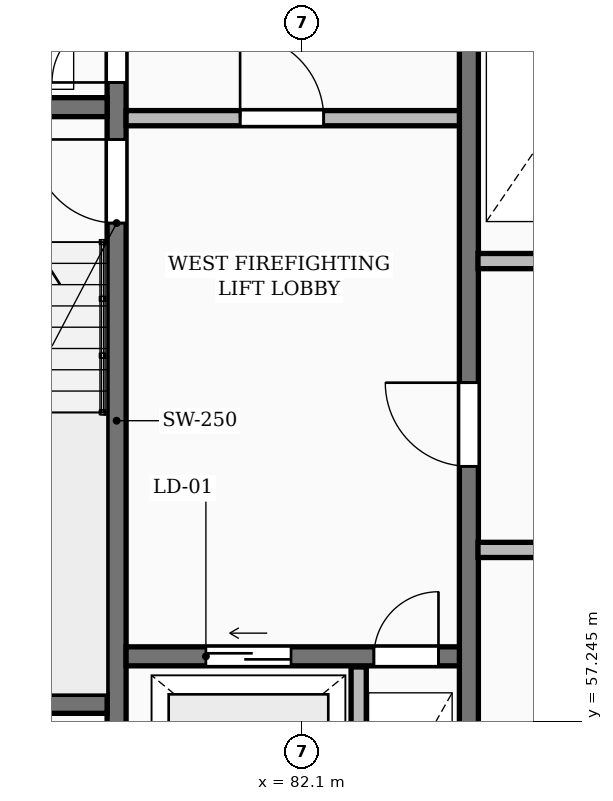
"""IFC4 building model, lengths in metres.
Left out: names, types, materials, properties, quantities, classifications, styles, units other than length and angle.
Written with IfcOpenShell. Run it as: python <this file> out.ifc"""

import sys

from ifc_helpers import new_model, si_unit, direction, frame, frame_2d, origin, place, context, subcontext, project, spatial, rectangle, extrude, element, fill, save


model = new_model("IFC4")
c1 = context("Model", 3, precision=1e-05, world=origin(), true_north=direction((0.0, 1.0)))
c2 = subcontext(c1, "Body", "Model", "MODEL_VIEW")
j1 = project(units=[si_unit("LENGTHUNIT", "METRE"), si_unit("PLANEANGLEUNIT", "RADIAN")], contexts=[c1])
p1 = place(None, origin())
s1 = spatial("IfcSite", under=j1, at=p1, CompositionType="ELEMENT")
p2 = place(p1, origin())
s2 = spatial("IfcBuilding", under=s1, at=p2, CompositionType="ELEMENT")
p3 = place(p2, frame((0.0, 0.0, 210.85)))
s3 = spatial("IfcBuildingStorey", under=s2, at=p3, CompositionType="ELEMENT", Elevation=210.85)
p4 = place(p3, frame((79.665, 55.4, 0.0), z_axis=(0.0, 0.0, 1.0), x_axis=(0.0, 1.0, 0.0)))
e1 = element("IfcWall", 1, at=p4, inside=s3, PredefinedType="SHEAR", context=c2, shape_type="SweptSolid", body=[
    extrude(rectangle(XDim=11.6, YDim=0.25, at=frame_2d((5.8, 0.0))), origin(), (0.0, 0.0, 1.0), 3.25),
])
p5 = place(p4, frame((0.55, 0.0, 0.0)))
e2 = element("IfcOpeningElement", 2, at=p5, cuts=e1, PredefinedType="OPENING", context=c2, shape_type="SweptSolid", body=[
    extrude(rectangle(XDim=0.85, YDim=2.05, at=frame_2d((0.425, 1.025))), frame((0.0, 0.135, 0.0), z_axis=(0.0, -1.0, 0.0), x_axis=(1.0, 0.0, 0.0)), (0.0, 0.0, 1.0), 0.27),
])
p6 = place(p4, frame((8.4, 0.0, 0.0)))
e3 = element("IfcOpeningElement", 3, at=p6, cuts=e1, PredefinedType="OPENING", context=c2, shape_type="SweptSolid", body=[
    extrude(rectangle(XDim=1.1, YDim=2.1, at=frame_2d((0.55, 1.05))), frame((0.0, 0.135, 0.0), z_axis=(0.0, -1.0, 0.0), x_axis=(1.0, 0.0, 0.0)), (0.0, 0.0, 1.0), 0.27),
])
p7 = place(p4, frame((10.25, 0.0, 0.0)))
e4 = element("IfcOpeningElement", 4, at=p7, cuts=e1, PredefinedType="OPENING", context=c2, shape_type="SweptSolid", body=[
    extrude(rectangle(XDim=0.85, YDim=2.05, at=frame_2d((0.425, 1.025))), frame((0.0, 0.135, 0.0), z_axis=(0.0, -1.0, 0.0), x_axis=(1.0, 0.0, 0.0)), (0.0, 0.0, 1.0), 0.27),
])
for number, where, z_axis, x_axis in (
    (5, (76.3, 57.475, 0.0), (0.0, 0.0, 1.0), (1.0, 0.0, 0.0)),
    (6, (76.3, 65.325, 0.0), (0.0, 0.0, 1.0), (1.0, 0.0, 0.0)),
):
    element("IfcWall", number, at=place(p3, frame(where, z_axis=z_axis, x_axis=x_axis)), inside=s3, PredefinedType="SHEAR", context=c2, shape_type="SweptSolid", body=[
        extrude(rectangle(XDim=3.24, YDim=0.25, at=frame_2d((1.62, 0.0))), origin(), (0.0, 0.0, 1.0), 3.25),
    ])
p8 = place(p3, frame((79.79, 58.1, 0.0), z_axis=(0.0, 0.0, 1.0), x_axis=(1.0, 0.0, 0.0)))
e7 = element("IfcWall", 7, at=p8, inside=s3, PredefinedType="SHEAR", context=c2, shape_type="SweptSolid", body=[
    extrude(rectangle(XDim=4.39, YDim=0.25, at=frame_2d((2.195, 0.0))), origin(), (0.0, 0.0, 1.0), 3.25),
])
p9 = place(p8, frame((1.05, 0.0, 0.0)))
e8 = element("IfcOpeningElement", 8, at=p9, cuts=e7, PredefinedType="OPENING", context=c2, shape_type="SweptSolid", body=[
    extrude(rectangle(XDim=1.12, YDim=2.12, at=frame_2d((0.56, 1.06))), frame((0.0, 0.135, 0.0), z_axis=(0.0, -1.0, 0.0), x_axis=(1.0, 0.0, 0.0)), (0.0, 0.0, 1.0), 0.27),
])
p10 = place(p8, frame((3.26, 0.0, 0.0)))
e9 = element("IfcOpeningElement", 9, at=p10, cuts=e7, PredefinedType="OPENING", context=c2, shape_type="SweptSolid", body=[
    extrude(rectangle(XDim=0.85, YDim=2.05, at=frame_2d((0.425, 1.025))), frame((0.0, 0.135, 0.0), z_axis=(0.0, -1.0, 0.0), x_axis=(1.0, 0.0, 0.0)), (0.0, 0.0, 1.0), 0.27),
])
p11 = place(p3, frame((82.85, 55.4, 0.0), z_axis=(0.0, 0.0, 1.0), x_axis=(0.0, 1.0, 0.0)))
e10 = element("IfcWall", 10, at=p11, inside=s3, PredefinedType="PARTITIONING", context=c2, shape_type="SweptSolid", body=[
    extrude(rectangle(XDim=2.56, YDim=0.2, at=frame_2d((1.28, 0.0))), origin(), (0.0, 0.0, 1.0), 2.97),
])
p12 = place(p3, frame((79.79, 65.18, 0.0), z_axis=(0.0, 0.0, 1.0), x_axis=(1.0, 0.0, 0.0)))
e11 = element("IfcWall", 11, at=p12, inside=s3, PredefinedType="PARTITIONING", context=c2, shape_type="SweptSolid", body=[
    extrude(rectangle(XDim=4.39, YDim=0.2, at=frame_2d((2.195, 0.0))), origin(), (0.0, 0.0, 1.0), 2.97),
])
p13 = place(p12, frame((1.5, 0.0, 0.0)))
e12 = element("IfcOpeningElement", 12, at=p13, cuts=e11, PredefinedType="OPENING", context=c2, shape_type="SweptSolid", body=[
    extrude(rectangle(XDim=1.1, YDim=2.1, at=frame_2d((0.55, 1.05))), frame((0.0, 0.11, 0.0), z_axis=(0.0, -1.0, 0.0), x_axis=(1.0, 0.0, 0.0)), (0.0, 0.0, 1.0), 0.22),
])
p14 = place(p3, frame((84.3, 55.4, 0.0), z_axis=(0.0, 0.0, 1.0), x_axis=(0.0, 1.0, 0.0)))
e13 = element("IfcWall", 13, at=p14, inside=s3, PredefinedType="SHEAR", context=c2, shape_type="SweptSolid", body=[
    extrude(rectangle(XDim=11.6, YDim=0.25, at=frame_2d((5.8, 0.0))), origin(), (0.0, 0.0, 1.0), 3.25),
])
p15 = place(p14, frame((5.2, 0.0, 0.0)))
e14 = element("IfcOpeningElement", 14, at=p15, cuts=e13, PredefinedType="OPENING", context=c2, shape_type="SweptSolid", body=[
    extrude(rectangle(XDim=1.1, YDim=2.1, at=frame_2d((0.55, 1.05))), frame((0.0, 0.135, 0.0), z_axis=(0.0, -1.0, 0.0), x_axis=(1.0, 0.0, 0.0)), (0.0, 0.0, 1.0), 0.27),
])
p16 = place(p3, frame((84.42, 59.5, 0.0), z_axis=(0.0, 0.0, 1.0), x_axis=(1.0, 0.0, 0.0)))
e15 = element("IfcWall", 15, at=p16, inside=s3, PredefinedType="PARTITIONING", context=c2, shape_type="SweptSolid", body=[
    extrude(rectangle(XDim=8.36, YDim=0.2, at=frame_2d((4.18, 0.0))), origin(), (0.0, 0.0, 1.0), 2.97),
])
p17 = place(p16, frame((3.4, 0.0, 0.0)))
e16 = element("IfcOpeningElement", 16, at=p17, cuts=e15, PredefinedType="OPENING", context=c2, shape_type="SweptSolid", body=[
    extrude(rectangle(XDim=0.92, YDim=2.08, at=frame_2d((0.46, 1.04))), frame((0.0, 0.11, 0.0), z_axis=(0.0, -1.0, 0.0), x_axis=(1.0, 0.0, 0.0)), (0.0, 0.0, 1.0), 0.22),
])
p18 = place(p3, frame((84.42, 63.3, 0.0), z_axis=(0.0, 0.0, 1.0), x_axis=(1.0, 0.0, 0.0)))
e17 = element("IfcWall", 17, at=p18, inside=s3, PredefinedType="PARTITIONING", context=c2, shape_type="SweptSolid", body=[
    extrude(rectangle(XDim=19.83, YDim=0.2, at=frame_2d((9.915, 0.0))), origin(), (0.0, 0.0, 1.0), 2.97),
])
p19 = place(p18, frame((1.15, 0.0, 0.0)))
e18 = element("IfcOpeningElement", 18, at=p19, cuts=e17, PredefinedType="OPENING", context=c2, shape_type="SweptSolid", body=[
    extrude(rectangle(XDim=0.85, YDim=2.05, at=frame_2d((0.425, 1.025))), frame((0.0, 0.11, 0.0), z_axis=(0.0, -1.0, 0.0), x_axis=(1.0, 0.0, 0.0)), (0.0, 0.0, 1.0), 0.22),
])
p20 = place(p18, frame((3.25, 0.0, 0.0)))
e19 = element("IfcOpeningElement", 19, at=p20, cuts=e17, PredefinedType="OPENING", context=c2, shape_type="SweptSolid", body=[
    extrude(rectangle(XDim=0.85, YDim=2.05, at=frame_2d((0.425, 1.025))), frame((0.0, 0.11, 0.0), z_axis=(0.0, -1.0, 0.0), x_axis=(1.0, 0.0, 0.0)), (0.0, 0.0, 1.0), 0.22),
])
p21 = place(p18, frame((13.08, 0.0, 0.0)))
e20 = element("IfcOpeningElement", 20, at=p21, cuts=e17, PredefinedType="OPENING", context=c2, shape_type="SweptSolid", body=[
    extrude(rectangle(XDim=1.5, YDim=2.2, at=frame_2d((0.75, 1.1))), frame((0.0, 0.11, 0.0), z_axis=(0.0, -1.0, 0.0), x_axis=(1.0, 0.0, 0.0)), (0.0, 0.0, 1.0), 0.22),
])
p22 = place(p18, frame((5.53, 0.0, 0.0)))
e21 = element("IfcOpeningElement", 21, at=p22, cuts=e17, PredefinedType="OPENING", context=c2, shape_type="SweptSolid", body=[
    extrude(rectangle(XDim=0.88, YDim=2.06, at=frame_2d((0.44, 1.03))), frame((0.0, 0.11, 0.0), z_axis=(0.0, -1.0, 0.0), x_axis=(1.0, 0.0, 0.0)), (0.0, 0.0, 1.0), 0.22),
])
p23 = place(p18, frame((7.68, 0.0, 0.0)))
e22 = element("IfcOpeningElement", 22, at=p23, cuts=e17, PredefinedType="OPENING", context=c2, shape_type="SweptSolid", body=[
    extrude(rectangle(XDim=0.88, YDim=2.06, at=frame_2d((0.44, 1.03))), frame((0.0, 0.11, 0.0), z_axis=(0.0, -1.0, 0.0), x_axis=(1.0, 0.0, 0.0)), (0.0, 0.0, 1.0), 0.22),
])
p24 = place(p18, frame((10.43, 0.0, 0.0)))
e23 = element("IfcOpeningElement", 23, at=p24, cuts=e17, PredefinedType="OPENING", context=c2, shape_type="SweptSolid", body=[
    extrude(rectangle(XDim=0.85, YDim=2.05, at=frame_2d((0.425, 1.025))), frame((0.0, 0.11, 0.0), z_axis=(0.0, -1.0, 0.0), x_axis=(1.0, 0.0, 0.0)), (0.0, 0.0, 1.0), 0.22),
])
p25 = place(p18, frame((16.23, 0.0, 0.0)))
e24 = element("IfcOpeningElement", 24, at=p25, cuts=e17, PredefinedType="OPENING", context=c2, shape_type="SweptSolid", body=[
    extrude(rectangle(XDim=0.96, YDim=2.1, at=frame_2d((0.48, 1.05))), frame((0.0, 0.11, 0.0), z_axis=(0.0, -1.0, 0.0), x_axis=(1.0, 0.0, 0.0)), (0.0, 0.0, 1.0), 0.22),
])
p26 = place(p18, frame((18.68, 0.0, 0.0)))
e25 = element("IfcOpeningElement", 25, at=p26, cuts=e17, PredefinedType="OPENING", context=c2, shape_type="SweptSolid", body=[
    extrude(rectangle(XDim=0.84, YDim=2.04, at=frame_2d((0.42, 1.02))), frame((0.0, 0.11, 0.0), z_axis=(0.0, -1.0, 0.0), x_axis=(1.0, 0.0, 0.0)), (0.0, 0.0, 1.0), 0.22),
])
p27 = place(p6, origin())
e26 = element("IfcDoor", 26, at=p27, inside=s3, OperationType="SINGLE_SWING_RIGHT", PredefinedType="DOOR", context=c2, shape_type="SweptSolid", body=[
    extrude(rectangle(XDim=1.1, YDim=2.1, at=frame_2d((0.55, 1.05))), frame((0.0, 0.025, 0.0), z_axis=(0.0, -1.0, 0.0), x_axis=(1.0, 0.0, 0.0)), (0.0, 0.0, 1.0), 0.05),
])
fill(e3, e26)
p28 = place(p7, origin())
e27 = element("IfcDoor", 27, at=p28, inside=s3, OperationType="SINGLE_SWING_LEFT", PredefinedType="DOOR", context=c2, shape_type="SweptSolid", body=[
    extrude(rectangle(XDim=0.85, YDim=2.05, at=frame_2d((0.425, 1.025))), frame((0.0, 0.025, 0.0), z_axis=(0.0, -1.0, 0.0), x_axis=(1.0, 0.0, 0.0)), (0.0, 0.0, 1.0), 0.05),
])
fill(e4, e27)
p29 = place(p9, origin())
e28 = element("IfcDoor", 28, at=p29, inside=s3, OperationType="SLIDING_TO_LEFT", PredefinedType="DOOR", context=c2, shape_type="SweptSolid", body=[
    extrude(rectangle(XDim=1.12, YDim=2.12, at=frame_2d((0.56, 1.06))), frame((0.0, 0.025, 0.0), z_axis=(0.0, -1.0, 0.0), x_axis=(1.0, 0.0, 0.0)), (0.0, 0.0, 1.0), 0.05),
])
fill(e8, e28)
p30 = place(p10, origin())
e29 = element("IfcDoor", 29, at=p30, inside=s3, OperationType="SINGLE_SWING_RIGHT", PredefinedType="DOOR", context=c2, shape_type="SweptSolid", body=[
    extrude(rectangle(XDim=0.85, YDim=2.05, at=frame_2d((0.425, 1.025))), frame((0.0, 0.025, 0.0), z_axis=(0.0, -1.0, 0.0), x_axis=(1.0, 0.0, 0.0)), (0.0, 0.0, 1.0), 0.05),
])
fill(e9, e29)
p31 = place(p13, origin())
e30 = element("IfcDoor", 30, at=p31, inside=s3, OperationType="SINGLE_SWING_LEFT", PredefinedType="DOOR", context=c2, shape_type="SweptSolid", body=[
    extrude(rectangle(XDim=1.1, YDim=2.1, at=frame_2d((0.55, 1.05))), frame((0.0, 0.025, 0.0), z_axis=(0.0, -1.0, 0.0), x_axis=(1.0, 0.0, 0.0)), (0.0, 0.0, 1.0), 0.05),
])
fill(e12, e30)
p32 = place(p15, origin())
e31 = element("IfcDoor", 31, at=p32, inside=s3, OperationType="SINGLE_SWING_RIGHT", PredefinedType="DOOR", context=c2, shape_type="SweptSolid", body=[
    extrude(rectangle(XDim=1.1, YDim=2.1, at=frame_2d((0.55, 1.05))), frame((0.0, 0.025, 0.0), z_axis=(0.0, -1.0, 0.0), x_axis=(1.0, 0.0, 0.0)), (0.0, 0.0, 1.0), 0.05),
])
fill(e14, e31)
save(model, sys.argv[1])
